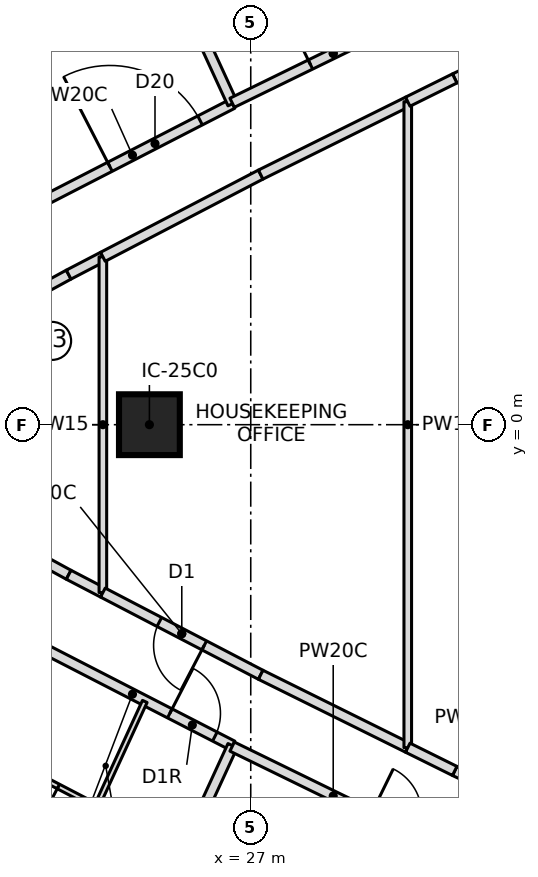
"""IFC4 building model, lengths in metres.
Left out: names, types, materials, properties, quantities, classifications, styles, units other than length and angle.
Written with IfcOpenShell. Run it as: python <this file> out.ifc"""

import sys

from ifc_helpers import new_model, si_unit, direction, frame, frame_2d, origin, origin_2d, place, context, subcontext, project, spatial, rectangle, extrude, element, fill, save


model = new_model("IFC4")
c1 = context("Model", 3, precision=1e-05, world=origin(), true_north=direction((0.0, 1.0)))
c2 = subcontext(c1, "Body", "Model", "MODEL_VIEW")
j1 = project(units=[si_unit("LENGTHUNIT", "METRE"), si_unit("PLANEANGLEUNIT", "RADIAN")], contexts=[c1])
p1 = place(None, origin())
s1 = spatial("IfcSite", under=j1, at=p1, CompositionType="ELEMENT")
p2 = place(p1, origin())
s2 = spatial("IfcBuilding", under=s1, at=p2, CompositionType="ELEMENT")
p3 = place(p2, frame((0.0, 0.0, 88.45)))
s3 = spatial("IfcBuildingStorey", under=s2, at=p3, CompositionType="ELEMENT", Elevation=88.45)
p4 = place(p3, frame((25.0, 0.0, 0.0), z_axis=(0.0, 0.0, 1.0), x_axis=(1.0, 0.0, 0.0)))
e1 = element("IfcColumn", 1, at=p4, inside=s3, PredefinedType="COLUMN", context=c2, shape_type="SweptSolid", body=[
    extrude(rectangle(XDim=1.2, YDim=1.2, at=origin_2d()), origin(), (0.0, 0.0, 1.0), 3.55),
])
p5 = place(p3, frame((22.69, 4.302, 0.0), z_axis=(0.0, 0.0, 1.0), x_axis=(0.889236075961, 0.457448577667, 0.0)))
e2 = element("IfcWall", 2, at=p5, inside=s3, PredefinedType="PARTITIONING", context=c2, shape_type="SweptSolid", body=[
    extrude(rectangle(XDim=4.443, YDim=0.2, at=frame_2d((2.222, 0.0))), origin(), (0.0, 0.0, 1.0), 3.25),
])
p6 = place(p5, frame((1.721, 0.0, 0.0)))
e3 = element("IfcOpeningElement", 3, at=p6, cuts=e2, PredefinedType="OPENING", context=c2, shape_type="SweptSolid", body=[
    extrude(rectangle(XDim=2.0, YDim=2.4, at=frame_2d((1.0, 1.2))), frame((0.0, 0.11, 0.0), z_axis=(0.0, -1.0, 0.0), x_axis=(1.0, 0.0, 0.0)), (0.0, 0.0, 1.0), 0.22),
])
p7 = place(p3, frame((26.641, 6.335, 0.0), z_axis=(0.0, 0.0, 1.0), x_axis=(-0.417455028008, 0.908697584233, 0.0)))
e4 = element("IfcWall", 4, at=p7, inside=s3, PredefinedType="PARTITIONING", context=c2, shape_type="SweptSolid", body=[
    extrude(rectangle(XDim=7.603, YDim=0.2, at=frame_2d((3.802, 0.0))), origin(), (0.0, 0.0, 1.0), 3.25),
])
p8 = place(p3, frame((26.633, 6.353, 0.0), z_axis=(0.0, 0.0, 1.0), x_axis=(0.898502457097, 0.438968489291, 0.0)))
e5 = element("IfcWall", 5, at=p8, inside=s3, PredefinedType="PARTITIONING", context=c2, shape_type="SweptSolid", body=[
    extrude(rectangle(XDim=4.44, YDim=0.2, at=frame_2d((2.22, 0.0))), origin(), (0.0, 0.0, 1.0), 3.25),
])
p9 = place(p8, frame((1.72, 0.0, 0.0)))
e6 = element("IfcOpeningElement", 6, at=p9, cuts=e5, PredefinedType="OPENING", context=c2, shape_type="SweptSolid", body=[
    extrude(rectangle(XDim=1.0, YDim=2.1, at=frame_2d((0.5, 1.05))), frame((0.0, 0.11, 0.0), z_axis=(0.0, -1.0, 0.0), x_axis=(1.0, 0.0, 0.0)), (0.0, 0.0, 1.0), 0.22),
])
p10 = place(p3, frame((22.69, -4.302, 0.0), z_axis=(0.0, 0.0, 1.0), x_axis=(0.889236075961, -0.457448577667, 0.0)))
e7 = element("IfcWall", 7, at=p10, inside=s3, PredefinedType="PARTITIONING", context=c2, shape_type="SweptSolid", body=[
    extrude(rectangle(XDim=4.443, YDim=0.2, at=frame_2d((2.222, 0.0))), origin(), (0.0, 0.0, 1.0), 3.25),
])
p11 = place(p10, frame((3.05, 0.0, 0.0)))
e8 = element("IfcOpeningElement", 8, at=p11, cuts=e7, PredefinedType="OPENING", context=c2, shape_type="SweptSolid", body=[
    extrude(rectangle(XDim=1.0, YDim=2.1, at=frame_2d((0.5, 1.05))), frame((0.0, 0.11, 0.0), z_axis=(0.0, -1.0, 0.0), x_axis=(1.0, 0.0, 0.0)), (0.0, 0.0, 1.0), 0.22),
])
p12 = place(p3, frame((24.909, -5.462, 0.0), z_axis=(0.0, 0.0, 1.0), x_axis=(-0.417454762401, -0.908697706253, 0.0)))
e9 = element("IfcWall", 9, at=p12, inside=s3, PredefinedType="PARTITIONING", context=c2, shape_type="SweptSolid", body=[
    extrude(rectangle(XDim=2.28, YDim=0.1, at=frame_2d((1.14, 0.0))), origin(), (0.0, 0.0, 1.0), 3.25),
])
p13 = place(p3, frame((23.958, -7.533, 0.0), z_axis=(0.0, 0.0, 1.0), x_axis=(-0.886911586599, 0.461939214135, 0.0)))
e10 = element("IfcWall", 10, at=p13, inside=s3, PredefinedType="PARTITIONING", context=c2, shape_type="SweptSolid", body=[
    extrude(rectangle(XDim=2.503, YDim=0.1, at=frame_2d((1.251, 0.0))), origin(), (0.0, 0.0, 1.0), 3.25),
])
p14 = place(p13, frame((0.85, 0.0, 0.0)))
e11 = element("IfcOpeningElement", 11, at=p14, cuts=e10, PredefinedType="OPENING", context=c2, shape_type="SweptSolid", body=[
    extrude(rectangle(XDim=0.8, YDim=2.1, at=frame_2d((0.4, 1.05))), frame((0.0, 0.06, 0.0), z_axis=(0.0, -1.0, 0.0), x_axis=(1.0, 0.0, 0.0)), (0.0, 0.0, 1.0), 0.12),
])
p15 = place(p3, frame((23.467, -13.244, 0.0), z_axis=(0.0, 0.0, 1.0), x_axis=(0.417455028008, 0.908697584233, 0.0)))
e12 = element("IfcWall", 12, at=p15, inside=s3, PredefinedType="PARTITIONING", context=c2, shape_type="SweptSolid", body=[
    extrude(rectangle(XDim=7.603, YDim=0.2, at=frame_2d((3.802, 0.0))), origin(), (0.0, 0.0, 1.0), 3.25),
])
p16 = place(p3, frame((26.633, -6.353, 0.0), z_axis=(0.0, 0.0, 1.0), x_axis=(0.898502457097, -0.438968489291, 0.0)))
e13 = element("IfcWall", 13, at=p16, inside=s3, PredefinedType="PARTITIONING", context=c2, shape_type="SweptSolid", body=[
    extrude(rectangle(XDim=4.44, YDim=0.2, at=frame_2d((2.22, 0.0))), origin(), (0.0, 0.0, 1.0), 3.25),
])
p17 = place(p16, frame((3.05, 0.0, 0.0)))
e14 = element("IfcOpeningElement", 14, at=p17, cuts=e13, PredefinedType="OPENING", context=c2, shape_type="SweptSolid", body=[
    extrude(rectangle(XDim=1.0, YDim=2.1, at=frame_2d((0.5, 1.05))), frame((0.0, 0.11, 0.0), z_axis=(0.0, -1.0, 0.0), x_axis=(1.0, 0.0, 0.0)), (0.0, 0.0, 1.0), 0.22),
])
p18 = place(p3, frame((23.407, -2.962, 0.0), z_axis=(0.0, 0.0, 1.0), x_axis=(-0.877465075585, 0.479640533242, 0.0)))
e15 = element("IfcWall", 15, at=p18, inside=s3, PredefinedType="PARTITIONING", context=c2, shape_type="SweptSolid", body=[
    extrude(rectangle(XDim=4.273, YDim=0.2, at=frame_2d((2.137, 0.0))), origin(), (0.0, 0.0, 1.0), 3.25),
])
p19 = place(p18, frame((1.636, 0.0, 0.0)))
e16 = element("IfcOpeningElement", 16, at=p19, cuts=e15, PredefinedType="OPENING", context=c2, shape_type="SweptSolid", body=[
    extrude(rectangle(XDim=1.0, YDim=2.1, at=frame_2d((0.5, 1.05))), frame((0.0, 0.11, 0.0), z_axis=(0.0, -1.0, 0.0), x_axis=(1.0, 0.0, 0.0)), (0.0, 0.0, 1.0), 0.22),
])
p20 = place(p3, frame((19.657, 0.912, 0.0), z_axis=(0.0, 0.0, 1.0), x_axis=(0.877465075585, 0.479640533242, 0.0)))
e17 = element("IfcWall", 17, at=p20, inside=s3, PredefinedType="PARTITIONING", context=c2, shape_type="SweptSolid", body=[
    extrude(rectangle(XDim=4.273, YDim=0.2, at=frame_2d((2.137, 0.0))), origin(), (0.0, 0.0, 1.0), 3.25),
])
for number, where, z_axis, x_axis in (
    (18, (23.407, 2.962, 0.0), (0.0, 0.0, 1.0), (0.887, 0.462, 0.0)),
    (19, (24.082, -3.313, 0.0), (0.0, 0.0, 1.0), (-0.887, 0.462, 0.0)),
):
    element("IfcWall", number, at=place(p3, frame(where, z_axis=z_axis, x_axis=x_axis)), inside=s3, PredefinedType="PARTITIONING", context=c2, shape_type="SweptSolid", body=[
        extrude(rectangle(XDim=0.761, YDim=0.2, at=frame_2d((0.381, 0.0))), origin(), (0.0, 0.0, 1.0), 3.25),
    ])
p21 = place(p3, frame((24.082, -3.313, 0.0), z_axis=(0.0, 0.0, 1.0), x_axis=(0.0, 1.0, 0.0)))
e20 = element("IfcWall", 20, at=p21, inside=s3, PredefinedType="PARTITIONING", context=c2, shape_type="SweptSolid", body=[
    extrude(rectangle(XDim=6.627, YDim=0.15, at=frame_2d((3.313, 0.0))), origin(), (0.0, 0.0, 1.0), 3.25),
])
p22 = place(p3, frame((27.196, -4.936, 0.0), z_axis=(0.0, 0.0, 1.0), x_axis=(-0.886893314466, 0.461974294476, 0.0)))
e21 = element("IfcWall", 21, at=p22, inside=s3, PredefinedType="PARTITIONING", context=c2, shape_type="SweptSolid", body=[
    extrude(rectangle(XDim=3.512, YDim=0.2, at=frame_2d((1.756, 0.0))), origin(), (0.0, 0.0, 1.0), 3.25),
])
p23 = place(p22, frame((1.256, 0.0, 0.0)))
e22 = element("IfcOpeningElement", 22, at=p23, cuts=e21, PredefinedType="OPENING", context=c2, shape_type="SweptSolid", body=[
    extrude(rectangle(XDim=1.0, YDim=2.1, at=frame_2d((0.5, 1.05))), frame((0.0, 0.11, 0.0), z_axis=(0.0, -1.0, 0.0), x_axis=(1.0, 0.0, 0.0)), (0.0, 0.0, 1.0), 0.22),
])
p24 = place(p3, frame((30.099, -6.375, 0.0), z_axis=(0.0, 0.0, 1.0), x_axis=(-0.895974251126, 0.444106002345, 0.0)))
e23 = element("IfcWall", 23, at=p24, inside=s3, PredefinedType="PARTITIONING", context=c2, shape_type="SweptSolid", body=[
    extrude(rectangle(XDim=3.24, YDim=0.2, at=frame_2d((1.62, 0.0))), origin(), (0.0, 0.0, 1.0), 3.25),
])
p25 = place(p3, frame((24.082, 3.313, 0.0), z_axis=(0.0, 0.0, 1.0), x_axis=(0.886893314466, 0.461974294476, 0.0)))
e24 = element("IfcWall", 24, at=p25, inside=s3, PredefinedType="PARTITIONING", context=c2, shape_type="SweptSolid", body=[
    extrude(rectangle(XDim=3.512, YDim=0.2, at=frame_2d((1.756, 0.0))), origin(), (0.0, 0.0, 1.0), 3.25),
])
p26 = place(p3, frame((27.196, 4.936, 0.0), z_axis=(0.0, 0.0, 1.0), x_axis=(0.895974251126, 0.444106002345, 0.0)))
e25 = element("IfcWall", 25, at=p26, inside=s3, PredefinedType="PARTITIONING", context=c2, shape_type="SweptSolid", body=[
    extrude(rectangle(XDim=3.24, YDim=0.2, at=frame_2d((1.62, 0.0))), origin(), (0.0, 0.0, 1.0), 3.25),
])
p27 = place(p3, frame((30.099, -6.375, 0.0), z_axis=(0.0, 0.0, 1.0), x_axis=(0.0, 1.0, 0.0)))
e26 = element("IfcWall", 26, at=p27, inside=s3, PredefinedType="PARTITIONING", context=c2, shape_type="SweptSolid", body=[
    extrude(rectangle(XDim=12.749, YDim=0.15, at=frame_2d((6.375, 0.0))), origin(), (0.0, 0.0, 1.0), 3.25),
])
for number, where, z_axis, x_axis in (
    (27, (31.025, 6.833, 0.0), (0.0, 0.0, 1.0), (0.905, 0.426, 0.0)),
    (28, (32.0, -7.293, 0.0), (0.0, 0.0, 1.0), (-0.905, 0.426, 0.0)),
):
    element("IfcWall", number, at=place(p3, frame(where, z_axis=z_axis, x_axis=x_axis)), inside=s3, PredefinedType="PARTITIONING", context=c2, shape_type="SweptSolid", body=[
        extrude(rectangle(XDim=1.078, YDim=0.2, at=frame_2d((0.539, 0.0))), origin(), (0.0, 0.0, 1.0), 3.25),
    ])
for number, where, z_axis, x_axis in (
    (29, (31.025, -6.833, 0.0), (0.0, 0.0, 1.0), (-0.896, 0.444, 0.0)),
    (30, (30.099, 6.375, 0.0), (0.0, 0.0, 1.0), (0.896, 0.444, 0.0)),
):
    element("IfcWall", number, at=place(p3, frame(where, z_axis=z_axis, x_axis=x_axis)), inside=s3, PredefinedType="PARTITIONING", context=c2, shape_type="SweptSolid", body=[
        extrude(rectangle(XDim=1.033, YDim=0.2, at=frame_2d((0.517, 0.0))), origin(), (0.0, 0.0, 1.0), 3.25),
    ])
p28 = place(p6, origin())
e31 = element("IfcDoor", 31, at=p28, inside=s3, OperationType="DOUBLE_DOOR_SINGLE_SWING", PredefinedType="DOOR", context=c2, shape_type="SweptSolid", body=[
    extrude(rectangle(XDim=2.0, YDim=2.4, at=frame_2d((1.0, 1.2))), frame((0.0, 0.025, 0.0), z_axis=(0.0, -1.0, 0.0), x_axis=(1.0, 0.0, 0.0)), (0.0, 0.0, 1.0), 0.05),
])
fill(e3, e31)
p29 = place(p9, origin())
e32 = element("IfcDoor", 32, at=p29, inside=s3, OperationType="SINGLE_SWING_LEFT", PredefinedType="DOOR", context=c2, shape_type="SweptSolid", body=[
    extrude(rectangle(XDim=1.0, YDim=2.1, at=frame_2d((0.5, 1.05))), frame((0.0, 0.025, 0.0), z_axis=(0.0, -1.0, 0.0), x_axis=(1.0, 0.0, 0.0)), (0.0, 0.0, 1.0), 0.05),
])
fill(e6, e32)
p30 = place(p14, origin())
e33 = element("IfcDoor", 33, at=p30, inside=s3, OperationType="SINGLE_SWING_LEFT", PredefinedType="DOOR", context=c2, shape_type="SweptSolid", body=[
    extrude(rectangle(XDim=0.8, YDim=2.1, at=frame_2d((0.4, 1.05))), frame((0.0, 0.025, 0.0), z_axis=(0.0, -1.0, 0.0), x_axis=(1.0, 0.0, 0.0)), (0.0, 0.0, 1.0), 0.05),
])
fill(e11, e33)
p31 = place(p11, origin())
e34 = element("IfcDoor", 34, at=p31, inside=s3, OperationType="SINGLE_SWING_RIGHT", PredefinedType="DOOR", context=c2, shape_type="SweptSolid", body=[
    extrude(rectangle(XDim=1.0, YDim=2.1, at=frame_2d((0.5, 1.05))), frame((0.0, 0.025, 0.0), z_axis=(0.0, -1.0, 0.0), x_axis=(1.0, 0.0, 0.0)), (0.0, 0.0, 1.0), 0.05),
])
fill(e8, e34)
p32 = place(p23, origin())
e35 = element("IfcDoor", 35, at=p32, inside=s3, OperationType="SINGLE_SWING_LEFT", PredefinedType="DOOR", context=c2, shape_type="SweptSolid", body=[
    extrude(rectangle(XDim=1.0, YDim=2.1, at=frame_2d((0.5, 1.05))), frame((0.0, 0.025, 0.0), z_axis=(0.0, -1.0, 0.0), x_axis=(1.0, 0.0, 0.0)), (0.0, 0.0, 1.0), 0.05),
])
fill(e22, e35)
save(model, sys.argv[1])
